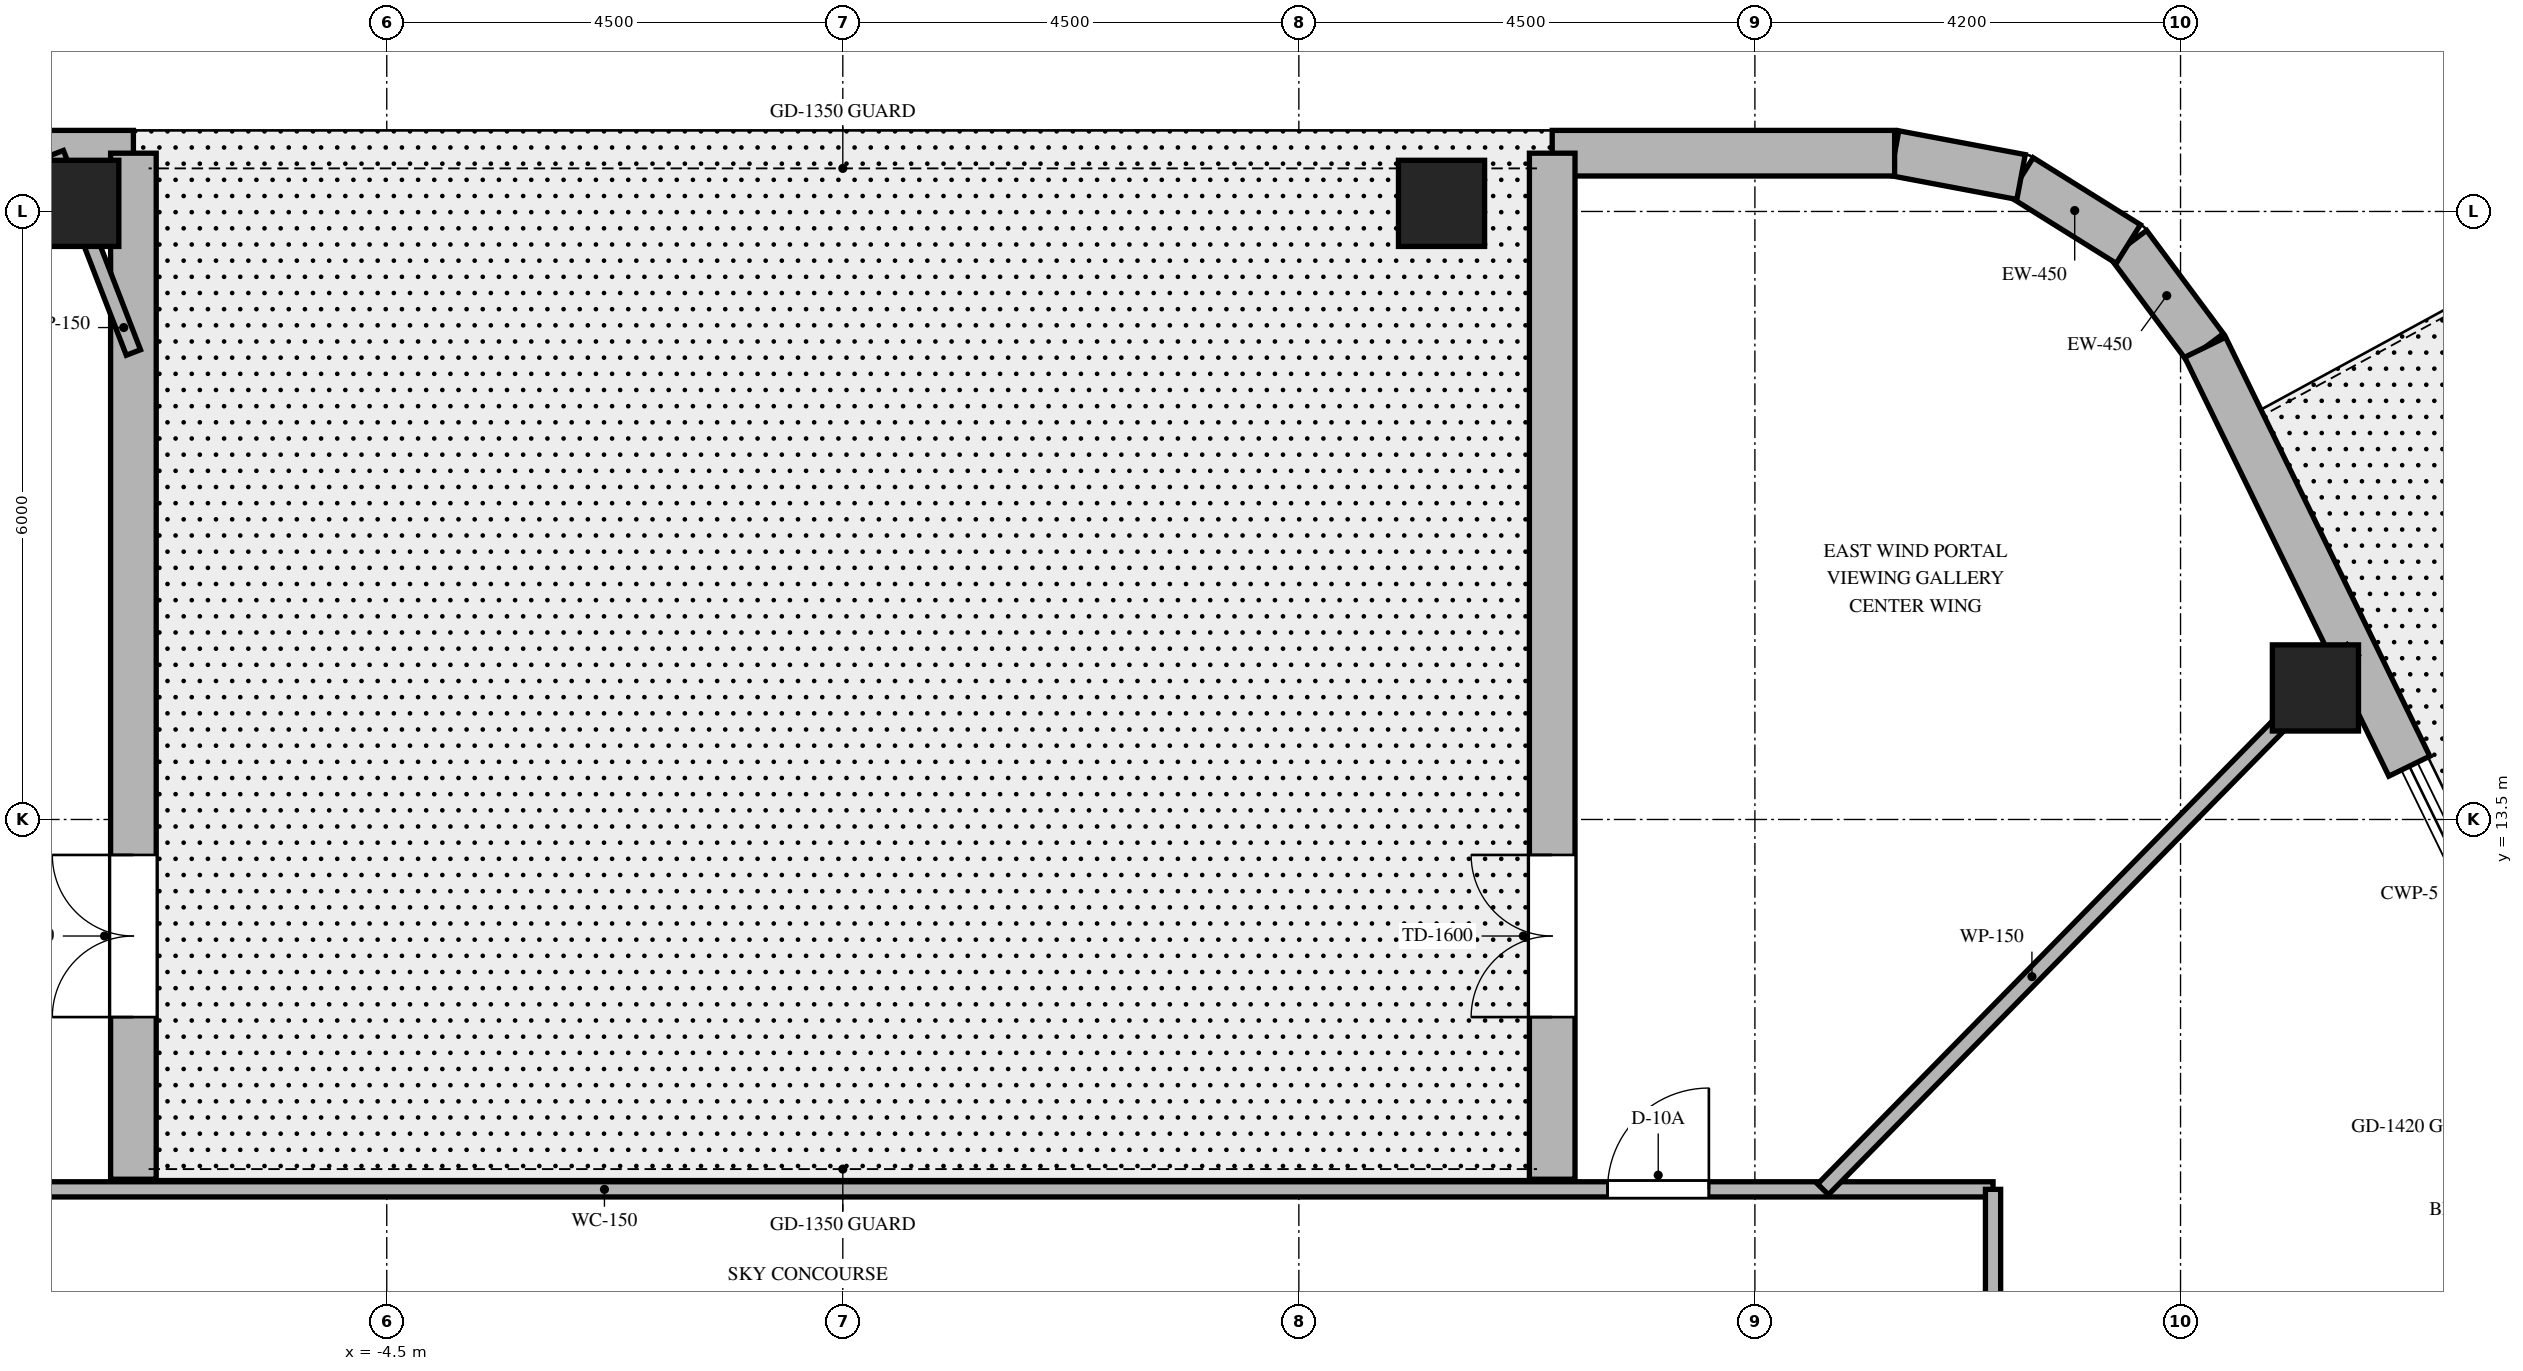
"""IFC4 building model, lengths in metres.
Left out: names, types, materials, properties, quantities, classifications, styles, units other than length and angle.
Written with IfcOpenShell. Run it as: python <this file> out.ifc"""

import sys

from ifc_helpers import new_model, si_unit, direction, frame, frame_2d, origin, origin_2d, place, context, subcontext, project, spatial, rectangle, extrude, element, fill, save


model = new_model("IFC4")
c1 = context("Model", 3, precision=1e-05, world=origin(), true_north=direction((0.0, 1.0)))
c2 = subcontext(c1, "Body", "Model", "MODEL_VIEW")
j1 = project(units=[si_unit("LENGTHUNIT", "METRE"), si_unit("PLANEANGLEUNIT", "RADIAN")], contexts=[c1])
p1 = place(None, origin())
s1 = spatial("IfcSite", under=j1, at=p1, CompositionType="ELEMENT")
p2 = place(p1, origin())
s2 = spatial("IfcBuilding", under=s1, at=p2, CompositionType="ELEMENT")
p3 = place(p2, frame((0.0, 0.0, 288.6)))
s3 = spatial("IfcBuildingStorey", under=s2, at=p3, CompositionType="ELEMENT", Elevation=288.6)
for number, where, z_axis, x_axis in (
    (1, (14.531, 14.798, 0.0), (0.0, 0.0, 1.0), (1.0, 0.0, 0.0)),
    (2, (5.908, 19.58, 0.0), (0.0, 0.0, 1.0), (1.0, 0.0, 0.0)),
    (3, (-7.569, 19.58, 0.0), (0.0, 0.0, 1.0), (1.0, 0.0, 0.0)),
):
    element("IfcColumn", number, at=place(p3, frame(where, z_axis=z_axis, x_axis=x_axis)), inside=s3, PredefinedType="COLUMN", context=c2, shape_type="SweptSolid", body=[
        extrude(rectangle(XDim=0.85, YDim=0.85, at=origin_2d()), origin(), (0.0, 0.0, 1.0), 4.5),
    ])
p4 = place(p3, frame((13.443, 18.16, 0.0), z_axis=(0.0, 0.0, 1.0), x_axis=(-0.597042425808, 0.802209661987, 0.0)))
e4 = element("IfcWall", 4, at=p4, inside=s3, PredefinedType="SOLIDWALL", context=c2, shape_type="SweptSolid", body=[
    extrude(rectangle(XDim=1.27, YDim=0.45, at=frame_2d((0.635, 0.0))), origin(), (0.0, 0.0, 1.0), 4.18),
])
p5 = place(p3, frame((12.685, 19.178, 0.0), z_axis=(0.0, 0.0, 1.0), x_axis=(-0.848031272749, 0.529946186362, 0.0)))
e5 = element("IfcWall", 5, at=p5, inside=s3, PredefinedType="SOLIDWALL", context=c2, shape_type="SweptSolid", body=[
    extrude(rectangle(XDim=1.248, YDim=0.45, at=frame_2d((0.624, 0.0))), origin(), (0.0, 0.0, 1.0), 4.18),
])
p6 = place(p3, frame((11.626, 19.84, 0.0), z_axis=(0.0, 0.0, 1.0), x_axis=(-0.982701956681, 0.185194126083, 0.0)))
e6 = element("IfcWall", 6, at=p6, inside=s3, PredefinedType="SOLIDWALL", context=c2, shape_type="SweptSolid", body=[
    extrude(rectangle(XDim=1.27, YDim=0.45, at=frame_2d((0.635, 0.0))), origin(), (0.0, 0.0, 1.0), 4.18),
])
p7 = place(p3, frame((15.458, 14.026, 0.0), z_axis=(0.0, 0.0, 1.0), x_axis=(-0.438101439155, 0.898925541416, 0.0)))
e7 = element("IfcWall", 7, at=p7, inside=s3, PredefinedType="SOLIDWALL", context=c2, shape_type="SweptSolid", body=[
    extrude(rectangle(XDim=4.599, YDim=0.45, at=frame_2d((2.299, 0.0))), origin(), (0.0, 0.0, 1.0), 4.18),
])
p8 = place(p3, frame((10.379, 20.075, 0.0), z_axis=(0.0, 0.0, 1.0), x_axis=(-1.0, 0.0, 0.0)))
e8 = element("IfcWall", 8, at=p8, inside=s3, PredefinedType="SOLIDWALL", context=c2, shape_type="SweptSolid", body=[
    extrude(rectangle(XDim=3.379, YDim=0.45, at=frame_2d((1.689, 0.0))), origin(), (0.0, 0.0, 1.0), 4.18),
])
p9 = place(p3, frame((-7.0, 20.075, 0.0), z_axis=(0.0, 0.0, 1.0), x_axis=(-1.0, 0.0, 0.0)))
e9 = element("IfcWall", 9, at=p9, inside=s3, PredefinedType="SOLIDWALL", context=c2, shape_type="SweptSolid", body=[
    extrude(rectangle(XDim=5.038, YDim=0.45, at=frame_2d((2.519, 0.0))), origin(), (0.0, 0.0, 1.0), 4.18),
])
p10 = place(p3, frame((-7.0, 9.95, 0.0), z_axis=(0.0, 0.0, 1.0), x_axis=(0.0, 1.0, 0.0)))
e10 = element("IfcWall", 10, at=p10, inside=s3, PredefinedType="SOLIDWALL", context=c2, shape_type="SweptSolid", body=[
    extrude(rectangle(XDim=10.125, YDim=0.45, at=frame_2d((5.062, 0.0))), origin(), (0.0, 0.0, 1.0), 4.18),
])
p11 = place(p10, frame((1.6, 0.0, 0.0)))
e11 = element("IfcOpeningElement", 11, at=p11, cuts=e10, PredefinedType="OPENING", context=c2, shape_type="SweptSolid", body=[
    extrude(rectangle(XDim=1.6, YDim=2.25, at=frame_2d((0.8, 1.125))), frame((0.0, 0.235, 0.0), z_axis=(0.0, -1.0, 0.0), x_axis=(1.0, 0.0, 0.0)), (0.0, 0.0, 1.0), 0.47),
])
p12 = place(p3, frame((7.0, 9.95, 0.0), z_axis=(0.0, 0.0, 1.0), x_axis=(0.0, 1.0, 0.0)))
e12 = element("IfcWall", 12, at=p12, inside=s3, PredefinedType="SOLIDWALL", context=c2, shape_type="SweptSolid", body=[
    extrude(rectangle(XDim=10.125, YDim=0.45, at=frame_2d((5.062, 0.0))), origin(), (0.0, 0.0, 1.0), 4.18),
])
p13 = place(p12, frame((1.6, 0.0, 0.0)))
e13 = element("IfcOpeningElement", 13, at=p13, cuts=e12, PredefinedType="OPENING", context=c2, shape_type="SweptSolid", body=[
    extrude(rectangle(XDim=1.6, YDim=2.25, at=frame_2d((0.8, 1.125))), frame((0.0, 0.235, 0.0), z_axis=(0.0, -1.0, 0.0), x_axis=(1.0, 0.0, 0.0)), (0.0, 0.0, 1.0), 0.47),
])
p14 = place(p3, frame((-11.35, 9.85, 0.0), z_axis=(0.0, 0.0, 1.0), x_axis=(1.0, 0.0, 0.0)))
e14 = element("IfcWall", 14, at=p14, inside=s3, PredefinedType="PARTITIONING", context=c2, shape_type="SweptSolid", body=[
    extrude(rectangle(XDim=22.7, YDim=0.15, at=frame_2d((11.35, 0.0))), origin(), (0.0, 0.0, 1.0), 3.67),
])
p15 = place(p14, frame((18.896, 0.0, 0.0)))
e15 = element("IfcOpeningElement", 15, at=p15, cuts=e14, PredefinedType="OPENING", context=c2, shape_type="SweptSolid", body=[
    extrude(rectangle(XDim=1.0, YDim=2.03, at=frame_2d((0.5, 1.015))), frame((0.0, 0.085, 0.0), z_axis=(0.0, -1.0, 0.0), x_axis=(1.0, 0.0, 0.0)), (0.0, 0.0, 1.0), 0.17),
])
p16 = place(p3, frame((11.35, 9.85, 0.0), z_axis=(0.0, 0.0, 1.0), x_axis=(0.0, -1.0, 0.0)))
e16 = element("IfcWall", 16, at=p16, inside=s3, PredefinedType="PARTITIONING", context=c2, shape_type="SweptSolid", body=[
    extrude(rectangle(XDim=19.7, YDim=0.15, at=frame_2d((9.85, 0.0))), origin(), (0.0, 0.0, 1.0), 3.67),
])
p17 = place(p16, frame((2.973, 0.0, 0.0)))
e17 = element("IfcOpeningElement", 17, at=p17, cuts=e16, PredefinedType="OPENING", context=c2, shape_type="SweptSolid", body=[
    extrude(rectangle(XDim=1.0, YDim=2.03, at=frame_2d((0.5, 1.015))), frame((0.0, 0.085, 0.0), z_axis=(0.0, -1.0, 0.0), x_axis=(1.0, 0.0, 0.0)), (0.0, 0.0, 1.0), 0.17),
])
p18 = place(p16, frame((15.189, 0.0, 0.0)))
e18 = element("IfcOpeningElement", 18, at=p18, cuts=e16, PredefinedType="OPENING", context=c2, shape_type="SweptSolid", body=[
    extrude(rectangle(XDim=1.0, YDim=2.03, at=frame_2d((0.5, 1.015))), frame((0.0, 0.085, 0.0), z_axis=(0.0, -1.0, 0.0), x_axis=(1.0, 0.0, 0.0)), (0.0, 0.0, 1.0), 0.17),
])
p19 = place(p16, frame((8.81, 0.0, 0.0)))
e19 = element("IfcOpeningElement", 19, at=p19, cuts=e16, PredefinedType="OPENING", context=c2, shape_type="SweptSolid", body=[
    extrude(rectangle(XDim=1.0, YDim=2.03, at=frame_2d((0.5, 1.015))), frame((0.0, 0.085, 0.0), z_axis=(0.0, -1.0, 0.0), x_axis=(1.0, 0.0, 0.0)), (0.0, 0.0, 1.0), 0.17),
])
p20 = place(p3, frame((9.672, 9.85, 0.0), z_axis=(0.0, 0.0, 1.0), x_axis=(0.700629771301, 0.713524998558, 0.0)))
e20 = element("IfcWall", 20, at=p20, inside=s3, PredefinedType="PARTITIONING", context=c2, shape_type="SweptSolid", body=[
    extrude(rectangle(XDim=7.459, YDim=0.15, at=frame_2d((3.73, 0.0))), origin(), (0.0, 0.0, 1.0), 3.52),
])
p21 = place(p3, frame((-7.0, 18.108, 0.0), z_axis=(0.0, 0.0, 1.0), x_axis=(-0.360646535801, 0.932702565781, 0.0)))
e21 = element("IfcWall", 21, at=p21, inside=s3, PredefinedType="PARTITIONING", context=c2, shape_type="SweptSolid", body=[
    extrude(rectangle(XDim=2.109, YDim=0.15, at=frame_2d((1.054, 0.0))), origin(), (0.0, 0.0, 1.0), 3.52),
])
p22 = place(p11, origin())
e22 = element("IfcDoor", 22, at=p22, inside=s3, OperationType="DOUBLE_SWING_LEFT", PredefinedType="DOOR", context=c2, shape_type="SweptSolid", body=[
    extrude(rectangle(XDim=1.6, YDim=2.25, at=frame_2d((0.8, 1.125))), frame((0.0, 0.025, 0.0), z_axis=(0.0, -1.0, 0.0), x_axis=(1.0, 0.0, 0.0)), (0.0, 0.0, 1.0), 0.05),
])
fill(e11, e22)
p23 = place(p13, origin())
e23 = element("IfcDoor", 23, at=p23, inside=s3, OperationType="DOUBLE_SWING_LEFT", PredefinedType="DOOR", context=c2, shape_type="SweptSolid", body=[
    extrude(rectangle(XDim=1.6, YDim=2.25, at=frame_2d((0.8, 1.125))), frame((0.0, 0.025, 0.0), z_axis=(0.0, -1.0, 0.0), x_axis=(1.0, 0.0, 0.0)), (0.0, 0.0, 1.0), 0.05),
])
fill(e13, e23)
p24 = place(p15, origin())
e24 = element("IfcDoor", 24, at=p24, inside=s3, OperationType="SINGLE_SWING_RIGHT", PredefinedType="DOOR", context=c2, shape_type="SweptSolid", body=[
    extrude(rectangle(XDim=1.0, YDim=2.03, at=frame_2d((0.5, 1.015))), frame((0.0, 0.025, 0.0), z_axis=(0.0, -1.0, 0.0), x_axis=(1.0, 0.0, 0.0)), (0.0, 0.0, 1.0), 0.05),
])
fill(e15, e24)
save(model, sys.argv[1])
